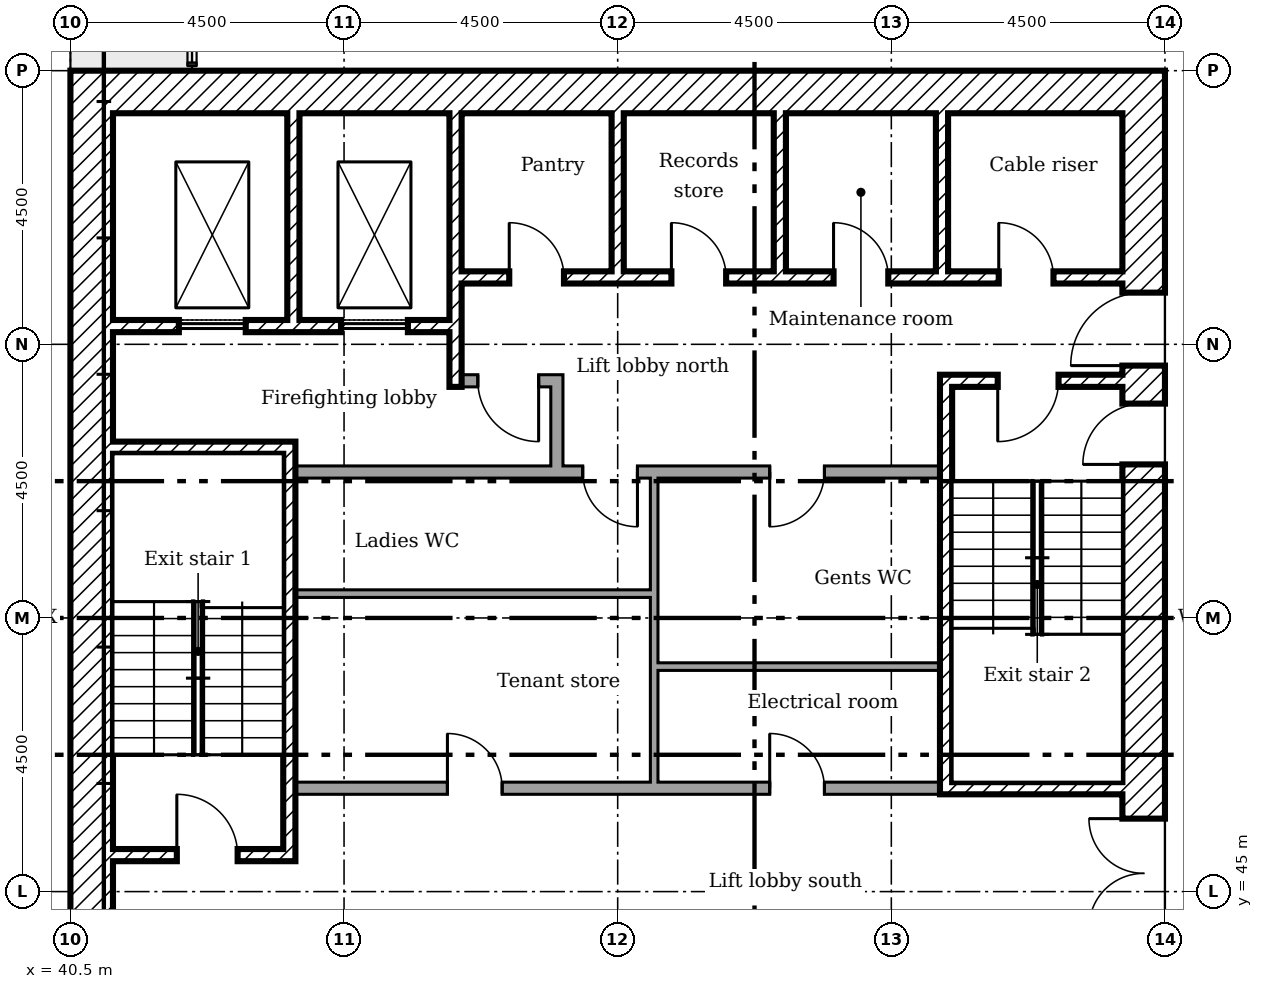
"""IFC4 building model, lengths in metres.
Left out: names, types, materials, properties, quantities, classifications, styles, units other than length and angle.
Written with IfcOpenShell. Run it as: python <this file> out.ifc"""

import sys

from ifc_helpers import new_model, si_unit, direction, frame, frame_2d, origin, place, context, subcontext, project, spatial, rectangle, extrude, element, fill, save


model = new_model("IFC4")
c1 = context("Model", 3, precision=1e-05, world=origin(), true_north=direction((0.0, 1.0)))
c2 = subcontext(c1, "Body", "Model", "MODEL_VIEW")
j1 = project(units=[si_unit("LENGTHUNIT", "METRE"), si_unit("PLANEANGLEUNIT", "RADIAN")], contexts=[c1])
p1 = place(None, origin())
s1 = spatial("IfcSite", under=j1, at=p1, CompositionType="ELEMENT")
p2 = place(p1, origin())
s2 = spatial("IfcBuilding", under=s1, at=p2, CompositionType="ELEMENT")
p3 = place(p2, frame((0.0, 0.0, 120.8)))
s3 = spatial("IfcBuildingStorey", under=s2, at=p3, CompositionType="ELEMENT", Elevation=120.8)
p4 = place(p3, frame((58.15, 40.5, 0.0), z_axis=(0.0, 0.0, 1.0), x_axis=(0.0, 1.0, 0.0)))
e1 = element("IfcWall", 1, at=p4, inside=s3, PredefinedType="SHEAR", context=c2, shape_type="SweptSolid", body=[
    extrude(rectangle(XDim=18.0, YDim=0.7, at=frame_2d((9.0, 0.0))), origin(), (0.0, 0.0, 1.0), 3.35),
])
p5 = place(p4, frame((13.15, 0.0, 0.0)))
e2 = element("IfcOpeningElement", 2, at=p5, cuts=e1, PredefinedType="OPENING", context=c2, shape_type="SweptSolid", body=[
    extrude(rectangle(XDim=1.2, YDim=2.1, at=frame_2d((0.6, 1.05))), frame((0.0, 0.36, 0.0), z_axis=(0.0, -1.0, 0.0), x_axis=(1.0, 0.0, 0.0)), (0.0, 0.0, 1.0), 0.72),
])
p6 = place(p4, frame((3.9, 0.0, 0.0)))
e3 = element("IfcOpeningElement", 3, at=p6, cuts=e1, PredefinedType="OPENING", context=c2, shape_type="SweptSolid", body=[
    extrude(rectangle(XDim=1.8, YDim=2.1, at=frame_2d((0.9, 1.05))), frame((0.0, 0.36, 0.0), z_axis=(0.0, -1.0, 0.0), x_axis=(1.0, 0.0, 0.0)), (0.0, 0.0, 1.0), 0.72),
])
p7 = place(p4, frame((11.525, 0.0, 0.0)))
e4 = element("IfcOpeningElement", 4, at=p7, cuts=e1, PredefinedType="OPENING", context=c2, shape_type="SweptSolid", body=[
    extrude(rectangle(XDim=1.0, YDim=2.1, at=frame_2d((0.5, 1.05))), frame((0.0, 0.36, 0.0), z_axis=(0.0, -1.0, 0.0), x_axis=(1.0, 0.0, 0.0)), (0.0, 0.0, 1.0), 0.72),
])
p8 = place(p3, frame((41.2, 58.15, 0.0)))
e5 = element("IfcWall", 5, at=p8, inside=s3, PredefinedType="SHEAR", context=c2, shape_type="SweptSolid", body=[
    extrude(rectangle(XDim=16.6, YDim=0.7, at=frame_2d((8.3, 0.0))), origin(), (0.0, 0.0, 1.0), 3.35),
])
p9 = place(p3, frame((40.85, 40.5, 0.0), z_axis=(0.0, 0.0, 1.0), x_axis=(0.0, 1.0, 0.0)))
e6 = element("IfcWall", 6, at=p9, inside=s3, PredefinedType="SHEAR", context=c2, shape_type="SweptSolid", body=[
    extrude(rectangle(XDim=18.0, YDim=0.7, at=frame_2d((9.0, 0.0))), origin(), (0.0, 0.0, 1.0), 3.35),
])
p10 = place(p3, frame((44.167, 57.8, 0.0), z_axis=(0.0, 0.0, 1.0), x_axis=(0.0, -1.0, 0.0)))
e7 = element("IfcWall", 7, at=p10, inside=s3, PredefinedType="SHEAR", context=c2, shape_type="SweptSolid", body=[
    extrude(rectangle(XDim=3.4, YDim=0.2, at=frame_2d((1.7, 0.0))), origin(), (0.0, 0.0, 1.0), 3.35),
])
p11 = place(p3, frame((46.833, 57.8, 0.0), z_axis=(0.0, 0.0, 1.0), x_axis=(0.0, -1.0, 0.0)))
e8 = element("IfcWall", 8, at=p11, inside=s3, PredefinedType="SHEAR", context=c2, shape_type="SweptSolid", body=[
    extrude(rectangle(XDim=4.5, YDim=0.2, at=frame_2d((2.25, 0.0))), origin(), (0.0, 0.0, 1.0), 3.35),
])
for number, where, z_axis, x_axis in (
    (9, (49.5, 57.8, 0.0), (0.0, 0.0, 1.0), (0.0, -1.0, 0.0)),
    (10, (52.167, 57.8, 0.0), (0.0, 0.0, 1.0), (0.0, -1.0, 0.0)),
    (11, (54.833, 57.8, 0.0), (0.0, 0.0, 1.0), (0.0, -1.0, 0.0)),
):
    element("IfcWall", number, at=place(p3, frame(where, z_axis=z_axis, x_axis=x_axis)), inside=s3, PredefinedType="SHEAR", context=c2, shape_type="SweptSolid", body=[
        extrude(rectangle(XDim=2.6, YDim=0.2, at=frame_2d((1.3, 0.0))), origin(), (0.0, 0.0, 1.0), 3.35),
    ])
p12 = place(p3, frame((48.5, 51.9, 0.0), z_axis=(0.0, 0.0, 1.0), x_axis=(0.0, 1.0, 0.0)))
e12 = element("IfcWall", 12, at=p12, inside=s3, PredefinedType="PARTITIONING", context=c2, shape_type="SweptSolid", body=[
    extrude(rectangle(XDim=1.6, YDim=0.2, at=frame_2d((0.8, 0.0))), origin(), (0.0, 0.0, 1.0), 3.35),
])
p13 = place(p3, frame((46.933, 53.4, 0.0)))
e13 = element("IfcWall", 13, at=p13, inside=s3, PredefinedType="PARTITIONING", context=c2, shape_type="SweptSolid", body=[
    extrude(rectangle(XDim=1.467, YDim=0.2, at=frame_2d((0.733, 0.0))), origin(), (0.0, 0.0, 1.0), 3.35),
])
p14 = place(p13, frame((0.267, 0.0, 0.0)))
e14 = element("IfcOpeningElement", 14, at=p14, cuts=e13, PredefinedType="OPENING", context=c2, shape_type="SweptSolid", body=[
    extrude(rectangle(XDim=1.0, YDim=2.1, at=frame_2d((0.5, 1.05))), frame((0.0, 0.11, 0.0), z_axis=(0.0, -1.0, 0.0), x_axis=(1.0, 0.0, 0.0)), (0.0, 0.0, 1.0), 0.22),
])
p15 = place(p3, frame((46.933, 55.1, 0.0)))
e15 = element("IfcWall", 15, at=p15, inside=s3, PredefinedType="SHEAR", context=c2, shape_type="SweptSolid", body=[
    extrude(rectangle(XDim=10.867, YDim=0.2, at=frame_2d((5.433, 0.0))), origin(), (0.0, 0.0, 1.0), 3.35),
])
p16 = place(p15, frame((8.833, 0.0, 0.0)))
e16 = element("IfcOpeningElement", 16, at=p16, cuts=e15, PredefinedType="OPENING", context=c2, shape_type="SweptSolid", body=[
    extrude(rectangle(XDim=0.9, YDim=2.1, at=frame_2d((0.45, 1.05))), frame((0.0, 0.11, 0.0), z_axis=(0.0, -1.0, 0.0), x_axis=(1.0, 0.0, 0.0)), (0.0, 0.0, 1.0), 0.22),
])
p17 = place(p15, frame((0.783, 0.0, 0.0)))
e17 = element("IfcOpeningElement", 17, at=p17, cuts=e15, PredefinedType="OPENING", context=c2, shape_type="SweptSolid", body=[
    extrude(rectangle(XDim=0.9, YDim=2.1, at=frame_2d((0.45, 1.05))), frame((0.0, 0.11, 0.0), z_axis=(0.0, -1.0, 0.0), x_axis=(1.0, 0.0, 0.0)), (0.0, 0.0, 1.0), 0.22),
])
p18 = place(p15, frame((3.45, 0.0, 0.0)))
e18 = element("IfcOpeningElement", 18, at=p18, cuts=e15, PredefinedType="OPENING", context=c2, shape_type="SweptSolid", body=[
    extrude(rectangle(XDim=0.9, YDim=2.1, at=frame_2d((0.45, 1.05))), frame((0.0, 0.11, 0.0), z_axis=(0.0, -1.0, 0.0), x_axis=(1.0, 0.0, 0.0)), (0.0, 0.0, 1.0), 0.22),
])
p19 = place(p15, frame((6.117, 0.0, 0.0)))
e19 = element("IfcOpeningElement", 19, at=p19, cuts=e15, PredefinedType="OPENING", context=c2, shape_type="SweptSolid", body=[
    extrude(rectangle(XDim=0.9, YDim=2.1, at=frame_2d((0.45, 1.05))), frame((0.0, 0.11, 0.0), z_axis=(0.0, -1.0, 0.0), x_axis=(1.0, 0.0, 0.0)), (0.0, 0.0, 1.0), 0.22),
])
p20 = place(p3, frame((41.2, 54.3, 0.0)))
e20 = element("IfcWall", 20, at=p20, inside=s3, PredefinedType="SHEAR", context=c2, shape_type="SweptSolid", body=[
    extrude(rectangle(XDim=5.533, YDim=0.2, at=frame_2d((2.767, 0.0))), origin(), (0.0, 0.0, 1.0), 3.35),
])
p21 = place(p20, frame((1.083, 0.0, 0.0)))
e21 = element("IfcOpeningElement", 21, at=p21, cuts=e20, PredefinedType="OPENING", context=c2, shape_type="SweptSolid", body=[
    extrude(rectangle(XDim=1.1, YDim=2.1, at=frame_2d((0.55, 1.05))), frame((0.0, 0.11, 0.0), z_axis=(0.0, -1.0, 0.0), x_axis=(1.0, 0.0, 0.0)), (0.0, 0.0, 1.0), 0.22),
])
p22 = place(p20, frame((3.75, 0.0, 0.0)))
e22 = element("IfcOpeningElement", 22, at=p22, cuts=e20, PredefinedType="OPENING", context=c2, shape_type="SweptSolid", body=[
    extrude(rectangle(XDim=1.1, YDim=2.1, at=frame_2d((0.55, 1.05))), frame((0.0, 0.11, 0.0), z_axis=(0.0, -1.0, 0.0), x_axis=(1.0, 0.0, 0.0)), (0.0, 0.0, 1.0), 0.22),
])
p23 = place(p3, frame((44.1, 45.5, 0.0), z_axis=(0.0, 0.0, 1.0), x_axis=(0.0, 1.0, 0.0)))
e23 = element("IfcWall", 23, at=p23, inside=s3, PredefinedType="SHEAR", context=c2, shape_type="SweptSolid", body=[
    extrude(rectangle(XDim=6.9, YDim=0.2, at=frame_2d((3.45, 0.0))), origin(), (0.0, 0.0, 1.0), 3.35),
])
p24 = place(p3, frame((41.2, 52.3, 0.0)))
e24 = element("IfcWall", 24, at=p24, inside=s3, PredefinedType="SHEAR", context=c2, shape_type="SweptSolid", body=[
    extrude(rectangle(XDim=2.8, YDim=0.2, at=frame_2d((1.4, 0.0))), origin(), (0.0, 0.0, 1.0), 3.35),
])
p25 = place(p3, frame((41.2, 45.6, 0.0)))
e25 = element("IfcWall", 25, at=p25, inside=s3, PredefinedType="SHEAR", context=c2, shape_type="SweptSolid", body=[
    extrude(rectangle(XDim=2.8, YDim=0.2, at=frame_2d((1.4, 0.0))), origin(), (0.0, 0.0, 1.0), 3.35),
])
p26 = place(p25, frame((1.05, 0.0, 0.0)))
e26 = element("IfcOpeningElement", 26, at=p26, cuts=e25, PredefinedType="OPENING", context=c2, shape_type="SweptSolid", body=[
    extrude(rectangle(XDim=1.0, YDim=2.1, at=frame_2d((0.5, 1.05))), frame((0.0, 0.11, 0.0), z_axis=(0.0, -1.0, 0.0), x_axis=(1.0, 0.0, 0.0)), (0.0, 0.0, 1.0), 0.22),
])
p27 = place(p3, frame((54.8, 53.4, 0.0)))
e27 = element("IfcWall", 27, at=p27, inside=s3, PredefinedType="SHEAR", context=c2, shape_type="SweptSolid", body=[
    extrude(rectangle(XDim=3.0, YDim=0.2, at=frame_2d((1.5, 0.0))), origin(), (0.0, 0.0, 1.0), 3.35),
])
p28 = place(p27, frame((0.95, 0.0, 0.0)))
e28 = element("IfcOpeningElement", 28, at=p28, cuts=e27, PredefinedType="OPENING", context=c2, shape_type="SweptSolid", body=[
    extrude(rectangle(XDim=1.0, YDim=2.1, at=frame_2d((0.5, 1.05))), frame((0.0, 0.11, 0.0), z_axis=(0.0, -1.0, 0.0), x_axis=(1.0, 0.0, 0.0)), (0.0, 0.0, 1.0), 0.22),
])
p29 = place(p3, frame((54.8, 46.7, 0.0)))
e29 = element("IfcWall", 29, at=p29, inside=s3, PredefinedType="SHEAR", context=c2, shape_type="SweptSolid", body=[
    extrude(rectangle(XDim=3.0, YDim=0.2, at=frame_2d((1.5, 0.0))), origin(), (0.0, 0.0, 1.0), 3.35),
])
p30 = place(p3, frame((54.9, 46.8, 0.0), z_axis=(0.0, 0.0, 1.0), x_axis=(0.0, 1.0, 0.0)))
e30 = element("IfcWall", 30, at=p30, inside=s3, PredefinedType="SHEAR", context=c2, shape_type="SweptSolid", body=[
    extrude(rectangle(XDim=6.5, YDim=0.2, at=frame_2d((3.25, 0.0))), origin(), (0.0, 0.0, 1.0), 3.35),
])
p31 = place(p3, frame((44.2, 51.9, 0.0)))
e31 = element("IfcWall", 31, at=p31, inside=s3, PredefinedType="PARTITIONING", context=c2, shape_type="SweptSolid", body=[
    extrude(rectangle(XDim=10.6, YDim=0.2, at=frame_2d((5.3, 0.0))), origin(), (0.0, 0.0, 1.0), 3.35),
])
p32 = place(p31, frame((4.725, 0.0, 0.0)))
e32 = element("IfcOpeningElement", 32, at=p32, cuts=e31, PredefinedType="OPENING", context=c2, shape_type="SweptSolid", body=[
    extrude(rectangle(XDim=0.9, YDim=2.1, at=frame_2d((0.45, 1.05))), frame((0.0, 0.11, 0.0), z_axis=(0.0, -1.0, 0.0), x_axis=(1.0, 0.0, 0.0)), (0.0, 0.0, 1.0), 0.22),
])
p33 = place(p31, frame((7.8, 0.0, 0.0)))
e33 = element("IfcOpeningElement", 33, at=p33, cuts=e31, PredefinedType="OPENING", context=c2, shape_type="SweptSolid", body=[
    extrude(rectangle(XDim=0.9, YDim=2.1, at=frame_2d((0.45, 1.05))), frame((0.0, 0.11, 0.0), z_axis=(0.0, -1.0, 0.0), x_axis=(1.0, 0.0, 0.0)), (0.0, 0.0, 1.0), 0.22),
])
p34 = place(p3, frame((44.2, 46.7, 0.0)))
e34 = element("IfcWall", 34, at=p34, inside=s3, PredefinedType="PARTITIONING", context=c2, shape_type="SweptSolid", body=[
    extrude(rectangle(XDim=10.6, YDim=0.2, at=frame_2d((5.3, 0.0))), origin(), (0.0, 0.0, 1.0), 3.35),
])
p35 = place(p34, frame((2.5, 0.0, 0.0)))
e35 = element("IfcOpeningElement", 35, at=p35, cuts=e34, PredefinedType="OPENING", context=c2, shape_type="SweptSolid", body=[
    extrude(rectangle(XDim=0.9, YDim=2.1, at=frame_2d((0.45, 1.05))), frame((0.0, 0.11, 0.0), z_axis=(0.0, -1.0, 0.0), x_axis=(1.0, 0.0, 0.0)), (0.0, 0.0, 1.0), 0.22),
])
p36 = place(p34, frame((7.8, 0.0, 0.0)))
e36 = element("IfcOpeningElement", 36, at=p36, cuts=e34, PredefinedType="OPENING", context=c2, shape_type="SweptSolid", body=[
    extrude(rectangle(XDim=0.9, YDim=2.1, at=frame_2d((0.45, 1.05))), frame((0.0, 0.11, 0.0), z_axis=(0.0, -1.0, 0.0), x_axis=(1.0, 0.0, 0.0)), (0.0, 0.0, 1.0), 0.22),
])
p37 = place(p3, frame((50.1, 46.8, 0.0), z_axis=(0.0, 0.0, 1.0), x_axis=(0.0, 1.0, 0.0)))
e37 = element("IfcWall", 37, at=p37, inside=s3, PredefinedType="PARTITIONING", context=c2, shape_type="SweptSolid", body=[
    extrude(rectangle(XDim=1.962, YDim=0.125, at=frame_2d((0.981, 0.0))), origin(), (0.0, 0.0, 1.0), 3.35),
])
p38 = place(p3, frame((54.8, 48.7, 0.0), z_axis=(0.0, 0.0, 1.0), x_axis=(-1.0, 0.0, 0.0)))
e38 = element("IfcWall", 38, at=p38, inside=s3, PredefinedType="PARTITIONING", context=c2, shape_type="SweptSolid", body=[
    extrude(rectangle(XDim=4.637, YDim=0.125, at=frame_2d((2.319, 0.0))), origin(), (0.0, 0.0, 1.0), 3.35),
])
p39 = place(p3, frame((50.1, 48.7, 0.0), z_axis=(0.0, 0.0, 1.0), x_axis=(0.0, 1.0, 0.0)))
e39 = element("IfcWall", 39, at=p39, inside=s3, PredefinedType="PARTITIONING", context=c2, shape_type="SweptSolid", body=[
    extrude(rectangle(XDim=1.262, YDim=0.125, at=frame_2d((0.631, 0.0))), origin(), (0.0, 0.0, 1.0), 3.35),
])
p40 = place(p3, frame((50.038, 49.9, 0.0), z_axis=(0.0, 0.0, 1.0), x_axis=(-1.0, 0.0, 0.0)))
e40 = element("IfcWall", 40, at=p40, inside=s3, PredefinedType="PARTITIONING", context=c2, shape_type="SweptSolid", body=[
    extrude(rectangle(XDim=5.838, YDim=0.125, at=frame_2d((2.919, 0.0))), origin(), (0.0, 0.0, 1.0), 3.35),
])
p41 = place(p3, frame((50.1, 49.9, 0.0), z_axis=(0.0, 0.0, 1.0), x_axis=(0.0, 1.0, 0.0)))
e41 = element("IfcWall", 41, at=p41, inside=s3, PredefinedType="PARTITIONING", context=c2, shape_type="SweptSolid", body=[
    extrude(rectangle(XDim=1.9, YDim=0.125, at=frame_2d((0.95, 0.0))), origin(), (0.0, 0.0, 1.0), 3.35),
])
p42 = place(p5, origin())
e42 = element("IfcDoor", 42, at=p42, inside=s3, OperationType="SINGLE_SWING_RIGHT", PredefinedType="DOOR", context=c2, shape_type="SweptSolid", body=[
    extrude(rectangle(XDim=1.2, YDim=2.1, at=frame_2d((0.6, 1.05))), frame((0.0, 0.025, 0.0), z_axis=(0.0, -1.0, 0.0), x_axis=(1.0, 0.0, 0.0)), (0.0, 0.0, 1.0), 0.05),
])
fill(e2, e42)
p43 = place(p6, origin())
e43 = element("IfcDoor", 43, at=p43, inside=s3, OperationType="DOUBLE_DOOR_SINGLE_SWING", PredefinedType="DOOR", context=c2, shape_type="SweptSolid", body=[
    extrude(rectangle(XDim=1.8, YDim=2.1, at=frame_2d((0.9, 1.05))), frame((0.0, 0.025, 0.0), z_axis=(0.0, -1.0, 0.0), x_axis=(1.0, 0.0, 0.0)), (0.0, 0.0, 1.0), 0.05),
])
fill(e3, e43)
p44 = place(p26, origin())
e44 = element("IfcDoor", 44, at=p44, inside=s3, OperationType="SINGLE_SWING_RIGHT", PredefinedType="DOOR", context=c2, shape_type="SweptSolid", body=[
    extrude(rectangle(XDim=1.0, YDim=2.1, at=frame_2d((0.5, 1.05))), frame((0.0, 0.025, 0.0), z_axis=(0.0, -1.0, 0.0), x_axis=(1.0, 0.0, 0.0)), (0.0, 0.0, 1.0), 0.05),
])
fill(e26, e44)
p45 = place(p28, frame((1.0, 0.0, 0.0), x_axis=(-1.0, 0.0, 0.0)))
e45 = element("IfcDoor", 45, at=p45, inside=s3, OperationType="SINGLE_SWING_LEFT", PredefinedType="DOOR", context=c2, shape_type="SweptSolid", body=[
    extrude(rectangle(XDim=1.0, YDim=2.1, at=frame_2d((0.5, 1.05))), frame((0.0, 0.025, 0.0), z_axis=(0.0, -1.0, 0.0), x_axis=(1.0, 0.0, 0.0)), (0.0, 0.0, 1.0), 0.05),
])
fill(e28, e45)
p46 = place(p7, origin())
e46 = element("IfcDoor", 46, at=p46, inside=s3, OperationType="SINGLE_SWING_RIGHT", PredefinedType="DOOR", context=c2, shape_type="SweptSolid", body=[
    extrude(rectangle(XDim=1.0, YDim=2.1, at=frame_2d((0.5, 1.05))), frame((0.0, 0.025, 0.0), z_axis=(0.0, -1.0, 0.0), x_axis=(1.0, 0.0, 0.0)), (0.0, 0.0, 1.0), 0.05),
])
fill(e4, e46)
p47 = place(p14, frame((1.0, 0.0, 0.0), x_axis=(-1.0, 0.0, 0.0)))
e47 = element("IfcDoor", 47, at=p47, inside=s3, OperationType="SINGLE_SWING_RIGHT", PredefinedType="DOOR", context=c2, shape_type="SweptSolid", body=[
    extrude(rectangle(XDim=1.0, YDim=2.1, at=frame_2d((0.5, 1.05))), frame((0.0, 0.025, 0.0), z_axis=(0.0, -1.0, 0.0), x_axis=(1.0, 0.0, 0.0)), (0.0, 0.0, 1.0), 0.05),
])
fill(e14, e47)
p48 = place(p16, origin())
e48 = element("IfcDoor", 48, at=p48, inside=s3, OperationType="SINGLE_SWING_RIGHT", PredefinedType="DOOR", context=c2, shape_type="SweptSolid", body=[
    extrude(rectangle(XDim=0.9, YDim=2.1, at=frame_2d((0.45, 1.05))), frame((0.0, 0.025, 0.0), z_axis=(0.0, -1.0, 0.0), x_axis=(1.0, 0.0, 0.0)), (0.0, 0.0, 1.0), 0.05),
])
fill(e16, e48)
p49 = place(p17, origin())
e49 = element("IfcDoor", 49, at=p49, inside=s3, OperationType="SINGLE_SWING_RIGHT", PredefinedType="DOOR", context=c2, shape_type="SweptSolid", body=[
    extrude(rectangle(XDim=0.9, YDim=2.1, at=frame_2d((0.45, 1.05))), frame((0.0, 0.025, 0.0), z_axis=(0.0, -1.0, 0.0), x_axis=(1.0, 0.0, 0.0)), (0.0, 0.0, 1.0), 0.05),
])
fill(e17, e49)
p50 = place(p18, origin())
e50 = element("IfcDoor", 50, at=p50, inside=s3, OperationType="SINGLE_SWING_RIGHT", PredefinedType="DOOR", context=c2, shape_type="SweptSolid", body=[
    extrude(rectangle(XDim=0.9, YDim=2.1, at=frame_2d((0.45, 1.05))), frame((0.0, 0.025, 0.0), z_axis=(0.0, -1.0, 0.0), x_axis=(1.0, 0.0, 0.0)), (0.0, 0.0, 1.0), 0.05),
])
fill(e18, e50)
p51 = place(p19, origin())
e51 = element("IfcDoor", 51, at=p51, inside=s3, OperationType="SINGLE_SWING_RIGHT", PredefinedType="DOOR", context=c2, shape_type="SweptSolid", body=[
    extrude(rectangle(XDim=0.9, YDim=2.1, at=frame_2d((0.45, 1.05))), frame((0.0, 0.025, 0.0), z_axis=(0.0, -1.0, 0.0), x_axis=(1.0, 0.0, 0.0)), (0.0, 0.0, 1.0), 0.05),
])
fill(e19, e51)
p52 = place(p35, origin())
e52 = element("IfcDoor", 52, at=p52, inside=s3, OperationType="SINGLE_SWING_RIGHT", PredefinedType="DOOR", context=c2, shape_type="SweptSolid", body=[
    extrude(rectangle(XDim=0.9, YDim=2.1, at=frame_2d((0.45, 1.05))), frame((0.0, 0.025, 0.0), z_axis=(0.0, -1.0, 0.0), x_axis=(1.0, 0.0, 0.0)), (0.0, 0.0, 1.0), 0.05),
])
fill(e35, e52)
p53 = place(p32, frame((0.9, 0.0, 0.0), x_axis=(-1.0, 0.0, 0.0)))
e53 = element("IfcDoor", 53, at=p53, inside=s3, OperationType="SINGLE_SWING_RIGHT", PredefinedType="DOOR", context=c2, shape_type="SweptSolid", body=[
    extrude(rectangle(XDim=0.9, YDim=2.1, at=frame_2d((0.45, 1.05))), frame((0.0, 0.025, 0.0), z_axis=(0.0, -1.0, 0.0), x_axis=(1.0, 0.0, 0.0)), (0.0, 0.0, 1.0), 0.05),
])
fill(e32, e53)
p54 = place(p36, origin())
e54 = element("IfcDoor", 54, at=p54, inside=s3, OperationType="SINGLE_SWING_RIGHT", PredefinedType="DOOR", context=c2, shape_type="SweptSolid", body=[
    extrude(rectangle(XDim=0.9, YDim=2.1, at=frame_2d((0.45, 1.05))), frame((0.0, 0.025, 0.0), z_axis=(0.0, -1.0, 0.0), x_axis=(1.0, 0.0, 0.0)), (0.0, 0.0, 1.0), 0.05),
])
fill(e36, e54)
p55 = place(p33, frame((0.9, 0.0, 0.0), x_axis=(-1.0, 0.0, 0.0)))
e55 = element("IfcDoor", 55, at=p55, inside=s3, OperationType="SINGLE_SWING_LEFT", PredefinedType="DOOR", context=c2, shape_type="SweptSolid", body=[
    extrude(rectangle(XDim=0.9, YDim=2.1, at=frame_2d((0.45, 1.05))), frame((0.0, 0.025, 0.0), z_axis=(0.0, -1.0, 0.0), x_axis=(1.0, 0.0, 0.0)), (0.0, 0.0, 1.0), 0.05),
])
fill(e33, e55)
p56 = place(p21, origin())
e56 = element("IfcDoor", 56, at=p56, inside=s3, OperationType="SLIDING_TO_LEFT", PredefinedType="DOOR", context=c2, shape_type="SweptSolid", body=[
    extrude(rectangle(XDim=1.1, YDim=2.1, at=frame_2d((0.55, 1.05))), frame((0.0, 0.025, 0.0), z_axis=(0.0, -1.0, 0.0), x_axis=(1.0, 0.0, 0.0)), (0.0, 0.0, 1.0), 0.05),
])
fill(e21, e56)
p57 = place(p22, origin())
e57 = element("IfcDoor", 57, at=p57, inside=s3, OperationType="SLIDING_TO_LEFT", PredefinedType="DOOR", context=c2, shape_type="SweptSolid", body=[
    extrude(rectangle(XDim=1.1, YDim=2.1, at=frame_2d((0.55, 1.05))), frame((0.0, 0.025, 0.0), z_axis=(0.0, -1.0, 0.0), x_axis=(1.0, 0.0, 0.0)), (0.0, 0.0, 1.0), 0.05),
])
fill(e22, e57)
save(model, sys.argv[1])
